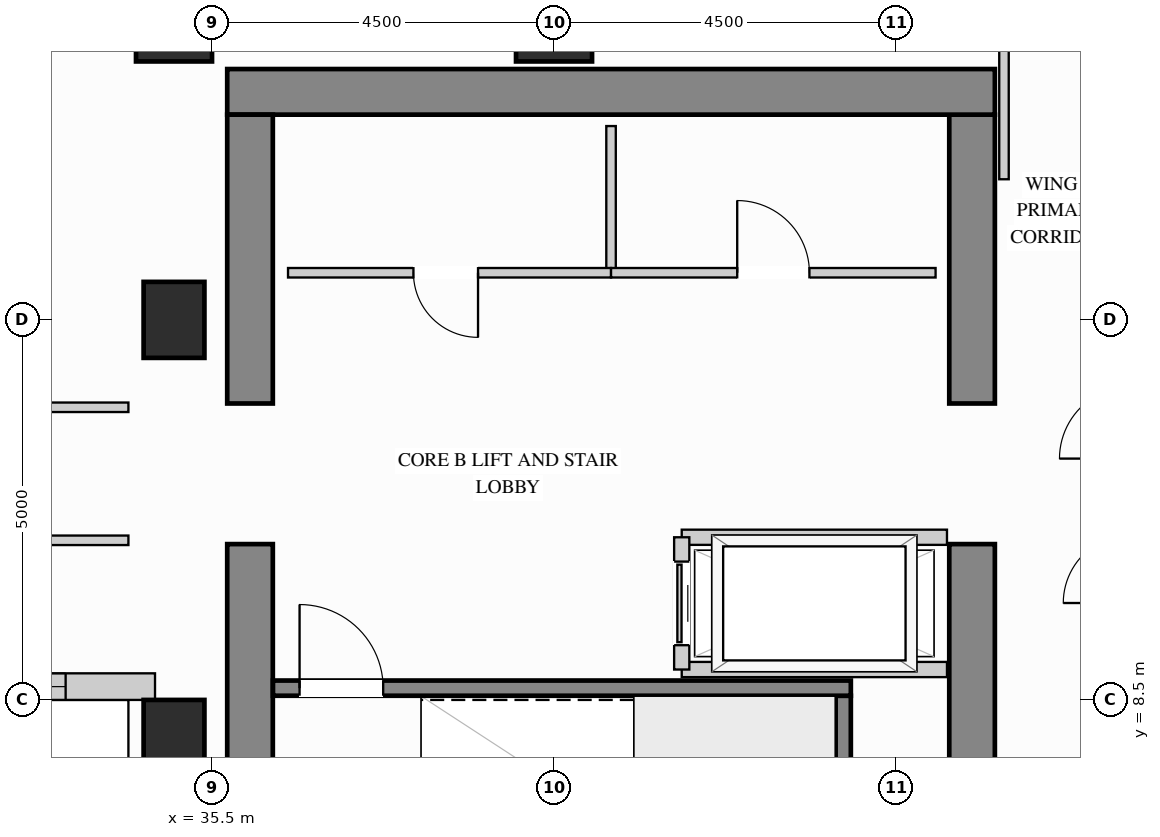
"""IFC4 building model, lengths in metres.
Left out: names, types, materials, properties, quantities, classifications, styles, units other than length and angle.
Written with IfcOpenShell. Run it as: python <this file> out.ifc"""

import sys

from ifc_helpers import new_model, si_unit, direction, frame, frame_2d, origin, origin_2d, place, context, subcontext, project, spatial, rectangle, extrude, source, transform, mapped, element, fill, save


model = new_model("IFC4")
c1 = context("Model", 3, precision=1e-05, world=origin(), true_north=direction((0.0, 1.0)))
c2 = subcontext(c1, "Body", "Model", "MODEL_VIEW")
j1 = project(units=[si_unit("LENGTHUNIT", "METRE"), si_unit("PLANEANGLEUNIT", "RADIAN")], contexts=[c1])
p1 = place(None, origin())
s1 = spatial("IfcSite", under=j1, at=p1, CompositionType="ELEMENT")
p2 = place(p1, origin())
s2 = spatial("IfcBuilding", under=s1, at=p2, CompositionType="ELEMENT")
p3 = place(p2, frame((0.0, 0.0, 193.5)))
s3 = spatial("IfcBuildingStorey", under=s2, at=p3, CompositionType="ELEMENT", Elevation=193.5)
m1 = source(origin(), c2, "Body", "SweptSolid", [
    extrude(rectangle(XDim=0.8, YDim=1.0, at=origin_2d()), origin(), (0.0, 0.0, 1.0), 3.4),
])
for number, where, z_axis, x_axis in (
    (1, (35.0, 13.5, 0.0), (0.0, 0.0, 1.0), (1.0, 0.0, 0.0)),
    (2, (35.0, 8.0, 0.0), (0.0, 0.0, 1.0), (1.0, 0.0, 0.0)),
):
    element("IfcColumn", number, at=place(p3, frame(where, z_axis=z_axis, x_axis=x_axis)), inside=s3, PredefinedType="COLUMN", context=c2, shape_type="MappedRepresentation", body=[
        mapped(m1, transform((0.0, 0.0, 0.0), x_axis=(1.0, 0.0, 0.0), y_axis=(0.0, 1.0, 0.0), z_axis=(0.0, 0.0, 1.0))),
    ])
m2 = source(origin(), c2, "Body", "SweptSolid", [
    extrude(rectangle(XDim=1.0, YDim=1.0, at=origin_2d()), origin(), (0.0, 0.0, 1.0), 3.4),
])
for number, where, z_axis, x_axis in (
    (3, (35.0, 17.4, 0.0), (0.0, 0.0, 1.0), (1.0, 0.0, 0.0)),
    (4, (40.0, 17.4, 0.0), (0.0, 0.0, 1.0), (1.0, 0.0, 0.0)),
):
    element("IfcColumn", number, at=place(p3, frame(where, z_axis=z_axis, x_axis=x_axis)), inside=s3, PredefinedType="COLUMN", context=c2, shape_type="MappedRepresentation", body=[
        mapped(m2, transform((0.0, 0.0, 0.0), x_axis=(1.0, 0.0, 0.0), y_axis=(0.0, 1.0, 0.0), z_axis=(0.0, 0.0, 1.0))),
    ])
m3 = source(origin(), c2, "Body", "SweptSolid", [
    extrude(rectangle(XDim=5.75, YDim=0.6, at=frame_2d((2.875, 0.0))), origin(), (0.0, 0.0, 1.0), 3.4),
])
p4 = place(p3, frame((45.5, 4.8, 0.0), z_axis=(0.0, 0.0, 1.0), x_axis=(0.0, 1.0, 0.0)))
e5 = element("IfcWall", 5, at=p4, inside=s3, PredefinedType="SHEAR", context=c2, shape_type="MappedRepresentation", body=[
    mapped(m3, transform((0.0, 0.0, 0.0), x_axis=(1.0, 0.0, 0.0), y_axis=(0.0, 1.0, 0.0), z_axis=(0.0, 0.0, 1.0))),
])
m4 = source(origin(), c2, "Body", "SweptSolid", [
    extrude(rectangle(XDim=3.8, YDim=0.6, at=frame_2d((1.9, 0.0))), origin(), (0.0, 0.0, 1.0), 3.4),
])
p5 = place(p3, frame((45.5, 12.4, 0.0), z_axis=(0.0, 0.0, 1.0), x_axis=(0.0, 1.0, 0.0)))
e6 = element("IfcWall", 6, at=p5, inside=s3, PredefinedType="SHEAR", context=c2, shape_type="MappedRepresentation", body=[
    mapped(m4, transform((0.0, 0.0, 0.0), x_axis=(1.0, 0.0, 0.0), y_axis=(0.0, 1.0, 0.0), z_axis=(0.0, 0.0, 1.0))),
])
m5 = source(origin(), c2, "Body", "SweptSolid", [
    extrude(rectangle(XDim=10.1, YDim=0.6, at=frame_2d((5.05, 0.0))), origin(), (0.0, 0.0, 1.0), 3.4),
])
p6 = place(p3, frame((35.7, 16.5, 0.0), z_axis=(0.0, 0.0, 1.0), x_axis=(1.0, 0.0, 0.0)))
e7 = element("IfcWall", 7, at=p6, inside=s3, PredefinedType="SHEAR", context=c2, shape_type="MappedRepresentation", body=[
    mapped(m5, transform((0.0, 0.0, 0.0), x_axis=(1.0, 0.0, 0.0), y_axis=(0.0, 1.0, 0.0), z_axis=(0.0, 0.0, 1.0))),
])
p7 = place(p3, frame((36.0, 4.8, 0.0), z_axis=(0.0, 0.0, 1.0), x_axis=(0.0, 1.0, 0.0)))
e8 = element("IfcWall", 8, at=p7, inside=s3, PredefinedType="SHEAR", context=c2, shape_type="MappedRepresentation", body=[
    mapped(m3, transform((0.0, 0.0, 0.0), x_axis=(1.0, 0.0, 0.0), y_axis=(0.0, 1.0, 0.0), z_axis=(0.0, 0.0, 1.0))),
])
p8 = place(p3, frame((36.0, 12.4, 0.0), z_axis=(0.0, 0.0, 1.0), x_axis=(0.0, 1.0, 0.0)))
e9 = element("IfcWall", 9, at=p8, inside=s3, PredefinedType="SHEAR", context=c2, shape_type="MappedRepresentation", body=[
    mapped(m4, transform((0.0, 0.0, 0.0), x_axis=(1.0, 0.0, 0.0), y_axis=(0.0, 1.0, 0.0), z_axis=(0.0, 0.0, 1.0))),
])
p9 = place(p3, frame((30.898, 8.675, 0.0), z_axis=(0.0, 0.0, 1.0), x_axis=(1.0, 0.0, 0.0)))
e10 = element("IfcWall", 10, at=p9, inside=s3, PredefinedType="SOLIDWALL", context=c2, shape_type="SweptSolid", body=[
    extrude(rectangle(XDim=3.852, YDim=0.35, at=frame_2d((1.926, 0.0))), origin(), (0.0, 0.0, 1.0), 3.385),
])
p10 = place(p9, frame((1.176, 0.0, 0.78)))
e11 = element("IfcOpeningElement", 11, at=p10, cuts=e10, PredefinedType="OPENING", context=c2, shape_type="SweptSolid", body=[
    extrude(rectangle(XDim=1.5, YDim=2.0, at=frame_2d((0.75, 1.0))), frame((0.0, 0.185, 0.0), z_axis=(0.0, -1.0, 0.0), x_axis=(1.0, 0.0, 0.0)), (0.0, 0.0, 1.0), 0.37),
])
m6 = source(origin(), c2, "Body", "SweptSolid", [
    extrude(rectangle(XDim=1.93, YDim=0.125, at=frame_2d((0.965, 0.0))), origin(), (0.0, 0.0, 1.0), 3.385),
])
p11 = place(p3, frame((40.75, 14.12, 0.0), z_axis=(0.0, 0.0, 1.0), x_axis=(0.0, 1.0, 0.0)))
e12 = element("IfcWall", 12, at=p11, inside=s3, PredefinedType="PARTITIONING", context=c2, shape_type="MappedRepresentation", body=[
    mapped(m6, transform((0.0, 0.0, 0.0), x_axis=(1.0, 0.0, 0.0), y_axis=(0.0, 1.0, 0.0), z_axis=(0.0, 0.0, 1.0))),
])
p12 = place(p3, frame((36.5, 14.12, 0.0), z_axis=(0.0, 0.0, 1.0), x_axis=(1.0, 0.0, 0.0)))
e13 = element("IfcWall", 13, at=p12, inside=s3, PredefinedType="PARTITIONING", context=c2, shape_type="SweptSolid", body=[
    extrude(rectangle(XDim=4.25, YDim=0.125, at=frame_2d((2.125, 0.0))), origin(), (0.0, 0.0, 1.0), 3.385),
])
p13 = place(p12, frame((1.65, 0.0, 0.0)))
e14 = element("IfcOpeningElement", 14, at=p13, cuts=e13, PredefinedType="OPENING", context=c2, shape_type="SweptSolid", body=[
    extrude(rectangle(XDim=0.85, YDim=2.1, at=frame_2d((0.425, 1.05))), frame((0.0, 0.073, 0.0), z_axis=(0.0, -1.0, 0.0), x_axis=(1.0, 0.0, 0.0)), (0.0, 0.0, 1.0), 0.145),
])
p14 = place(p3, frame((40.75, 14.12, 0.0), z_axis=(0.0, 0.0, 1.0), x_axis=(1.0, 0.0, 0.0)))
e15 = element("IfcWall", 15, at=p14, inside=s3, PredefinedType="PARTITIONING", context=c2, shape_type="SweptSolid", body=[
    extrude(rectangle(XDim=4.27, YDim=0.125, at=frame_2d((2.135, 0.0))), origin(), (0.0, 0.0, 1.0), 3.385),
])
p15 = place(p14, frame((1.66, 0.0, 0.0)))
e16 = element("IfcOpeningElement", 16, at=p15, cuts=e15, PredefinedType="OPENING", context=c2, shape_type="SweptSolid", body=[
    extrude(rectangle(XDim=0.95, YDim=2.15, at=frame_2d((0.475, 1.075))), frame((0.0, 0.073, 0.0), z_axis=(0.0, -1.0, 0.0), x_axis=(1.0, 0.0, 0.0)), (0.0, 0.0, 1.0), 0.145),
])
m7 = source(origin(), c2, "Body", "SweptSolid", [
    extrude(rectangle(XDim=2.298, YDim=0.125, at=frame_2d((1.149, 0.0))), origin(), (0.0, 0.0, 1.0), 3.385),
])
p16 = place(p3, frame((45.92, 15.35, 0.0), z_axis=(0.0, 0.0, 1.0), x_axis=(0.0, 1.0, 0.0)))
e17 = element("IfcWall", 17, at=p16, inside=s3, PredefinedType="PARTITIONING", context=c2, shape_type="MappedRepresentation", body=[
    mapped(m7, transform((0.0, 0.0, 0.0), x_axis=(1.0, 0.0, 0.0), y_axis=(0.0, 1.0, 0.0), z_axis=(0.0, 0.0, 1.0))),
])
p17 = place(p3, frame((29.85, 12.35, 0.0), z_axis=(0.0, 0.0, 1.0), x_axis=(1.0, 0.0, 0.0)))
e18 = element("IfcWall", 18, at=p17, inside=s3, PredefinedType="PARTITIONING", context=c2, shape_type="SweptSolid", body=[
    extrude(rectangle(XDim=4.55, YDim=0.125, at=frame_2d((2.275, 0.0))), origin(), (0.0, 0.0, 1.0), 3.385),
])
p18 = place(p17, frame((1.8, 0.0, 0.0)))
e19 = element("IfcOpeningElement", 19, at=p18, cuts=e18, PredefinedType="OPENING", context=c2, shape_type="SweptSolid", body=[
    extrude(rectangle(XDim=0.95, YDim=2.15, at=frame_2d((0.475, 1.075))), frame((0.0, 0.073, 0.0), z_axis=(0.0, -1.0, 0.0), x_axis=(1.0, 0.0, 0.0)), (0.0, 0.0, 1.0), 0.145),
])
p19 = place(p3, frame((19.5, 10.6, 0.0), z_axis=(0.0, 0.0, 1.0), x_axis=(1.0, 0.0, 0.0)))
e20 = element("IfcWall", 20, at=p19, inside=s3, PredefinedType="PARTITIONING", context=c2, shape_type="SweptSolid", body=[
    extrude(rectangle(XDim=14.9, YDim=0.125, at=frame_2d((7.45, 0.0))), origin(), (0.0, 0.0, 1.0), 3.385),
])
p20 = place(p19, frame((6.975, 0.0, 0.0)))
e21 = element("IfcOpeningElement", 21, at=p20, cuts=e20, PredefinedType="OPENING", context=c2, shape_type="SweptSolid", body=[
    extrude(rectangle(XDim=0.95, YDim=2.15, at=frame_2d((0.475, 1.075))), frame((0.0, 0.073, 0.0), z_axis=(0.0, -1.0, 0.0), x_axis=(1.0, 0.0, 0.0)), (0.0, 0.0, 1.0), 0.145),
])
m8 = source(origin(), c2, "Body", "SweptSolid", [
    extrude(rectangle(XDim=3.49, YDim=0.2, at=frame_2d((1.745, 0.0))), origin(), (0.0, 0.0, 1.0), 3.385),
])
for number, where, z_axis, x_axis in (
    (22, (41.68, 10.64, 0.0), (0.0, 0.0, 1.0), (1.0, 0.0, 0.0)),
    (23, (41.68, 8.9, 0.0), (0.0, 0.0, 1.0), (1.0, 0.0, 0.0)),
):
    element("IfcWall", number, at=place(p3, frame(where, z_axis=z_axis, x_axis=x_axis)), inside=s3, PredefinedType="PARTITIONING", context=c2, shape_type="MappedRepresentation", body=[
        mapped(m8, transform((0.0, 0.0, 0.0), x_axis=(1.0, 0.0, 0.0), y_axis=(0.0, 1.0, 0.0), z_axis=(0.0, 0.0, 1.0))),
    ])
p21 = place(p3, frame((41.68, 8.9, 0.0), z_axis=(0.0, 0.0, 1.0), x_axis=(0.0, 1.0, 0.0)))
e24 = element("IfcWall", 24, at=p21, inside=s3, PredefinedType="PARTITIONING", context=c2, shape_type="SweptSolid", body=[
    extrude(rectangle(XDim=1.74, YDim=0.2, at=frame_2d((0.87, 0.0))), origin(), (0.0, 0.0, 1.0), 3.385),
])
p22 = place(p21, frame((0.32, 0.0, 0.0)))
e25 = element("IfcOpeningElement", 25, at=p22, cuts=e24, PredefinedType="OPENING", context=c2, shape_type="SweptSolid", body=[
    extrude(rectangle(XDim=1.1, YDim=2.2, at=frame_2d((0.55, 1.1))), frame((0.0, 0.11, 0.0), z_axis=(0.0, -1.0, 0.0), x_axis=(1.0, 0.0, 0.0)), (0.0, 0.0, 1.0), 0.22),
])
m9 = source(origin(), c2, "Body", "SweptSolid", [
    extrude(rectangle(XDim=3.753, YDim=0.2, at=frame_2d((1.876, 0.0))), origin(), (0.0, 0.0, 1.0), 3.4),
])
p23 = place(p3, frame((43.805, 4.802, 0.0), z_axis=(0.0, 0.0, 1.0), x_axis=(0.0, 1.0, 0.0)))
e26 = element("IfcWall", 26, at=p23, inside=s3, PredefinedType="SHEAR", context=c2, shape_type="MappedRepresentation", body=[
    mapped(m9, transform((0.0, 0.0, 0.0), x_axis=(1.0, 0.0, 0.0), y_axis=(0.0, 1.0, 0.0), z_axis=(0.0, 0.0, 1.0))),
])
p24 = place(p3, frame((36.302, 8.655, 0.0), z_axis=(0.0, 0.0, 1.0), x_axis=(1.0, 0.0, 0.0)))
e27 = element("IfcWall", 27, at=p24, inside=s3, PredefinedType="SHEAR", context=c2, shape_type="SweptSolid", body=[
    extrude(rectangle(XDim=7.603, YDim=0.2, at=frame_2d((3.802, 0.0))), origin(), (0.0, 0.0, 1.0), 3.4),
])
p25 = place(p24, frame((0.35, 0.0, 0.0)))
e28 = element("IfcOpeningElement", 28, at=p25, cuts=e27, PredefinedType="OPENING", context=c2, shape_type="SweptSolid", body=[
    extrude(rectangle(XDim=1.1, YDim=2.15, at=frame_2d((0.55, 1.075))), frame((0.0, 0.11, 0.0), z_axis=(0.0, -1.0, 0.0), x_axis=(1.0, 0.0, 0.0)), (0.0, 0.0, 1.0), 0.22),
])
m10 = source(origin(), c2, "Body", "SweptSolid", [
    extrude(rectangle(XDim=1.1, YDim=2.2, at=frame_2d((0.55, 1.1))), frame((0.0, 0.025, 0.0), z_axis=(0.0, -1.0, 0.0), x_axis=(1.0, 0.0, 0.0)), (0.0, 0.0, 1.0), 0.05),
])
p26 = place(p22, origin())
e29 = element("IfcDoor", 29, at=p26, inside=s3, OperationType="SLIDING_TO_LEFT", PredefinedType="DOOR", context=c2, shape_type="MappedRepresentation", body=[
    mapped(m10, transform((0.0, 0.0, 0.0), x_axis=(1.0, 0.0, 0.0), y_axis=(0.0, 1.0, 0.0), z_axis=(0.0, 0.0, 1.0))),
])
fill(e25, e29)
m11 = source(origin(), c2, "Body", "SweptSolid", [
    extrude(rectangle(XDim=0.95, YDim=2.15, at=frame_2d((0.475, 1.075))), frame((0.0, 0.025, 0.0), z_axis=(0.0, -1.0, 0.0), x_axis=(1.0, 0.0, 0.0)), (0.0, 0.0, 1.0), 0.05),
])
p27 = place(p15, origin())
e30 = element("IfcDoor", 30, at=p27, inside=s3, OperationType="SINGLE_SWING_LEFT", PredefinedType="DOOR", context=c2, shape_type="MappedRepresentation", body=[
    mapped(m11, transform((0.0, 0.0, 0.0), x_axis=(1.0, 0.0, 0.0), y_axis=(0.0, 1.0, 0.0), z_axis=(0.0, 0.0, 1.0))),
])
fill(e16, e30)
m12 = source(origin(), c2, "Body", "SweptSolid", [
    extrude(rectangle(XDim=0.85, YDim=2.1, at=frame_2d((0.425, 1.05))), frame((0.0, 0.025, 0.0), z_axis=(0.0, -1.0, 0.0), x_axis=(1.0, 0.0, 0.0)), (0.0, 0.0, 1.0), 0.05),
])
p28 = place(p13, origin())
e31 = element("IfcDoor", 31, at=p28, inside=s3, OperationType="SINGLE_SWING_RIGHT", PredefinedType="DOOR", context=c2, shape_type="MappedRepresentation", body=[
    mapped(m12, transform((0.0, 0.0, 0.0), x_axis=(1.0, 0.0, 0.0), y_axis=(0.0, 1.0, 0.0), z_axis=(0.0, 0.0, 1.0))),
])
fill(e14, e31)
m13 = source(origin(), c2, "Body", "SweptSolid", [
    extrude(rectangle(XDim=1.1, YDim=2.15, at=frame_2d((0.55, 1.075))), frame((0.0, 0.025, 0.0), z_axis=(0.0, -1.0, 0.0), x_axis=(1.0, 0.0, 0.0)), (0.0, 0.0, 1.0), 0.05),
])
p29 = place(p25, origin())
e32 = element("IfcDoor", 32, at=p29, inside=s3, OperationType="SINGLE_SWING_LEFT", PredefinedType="DOOR", context=c2, shape_type="MappedRepresentation", body=[
    mapped(m13, transform((0.0, 0.0, 0.0), x_axis=(1.0, 0.0, 0.0), y_axis=(0.0, 1.0, 0.0), z_axis=(0.0, 0.0, 1.0))),
])
fill(e28, e32)
m14 = source(origin(), c2, "Body", "SweptSolid", [
    extrude(rectangle(XDim=1.5, YDim=2.0, at=frame_2d((0.75, 1.0))), frame((0.0, 0.03, 0.0), z_axis=(0.0, -1.0, 0.0), x_axis=(1.0, 0.0, 0.0)), (0.0, 0.0, 1.0), 0.06),
])
p30 = place(p10, origin())
e33 = element("IfcWindow", 33, at=p30, inside=s3, PartitioningType="SINGLE_PANEL", PredefinedType="WINDOW", context=c2, shape_type="MappedRepresentation", body=[
    mapped(m14, transform((0.0, 0.0, 0.0), x_axis=(1.0, 0.0, 0.0), y_axis=(0.0, 1.0, 0.0), z_axis=(0.0, 0.0, 1.0))),
])
fill(e11, e33)
save(model, sys.argv[1])
